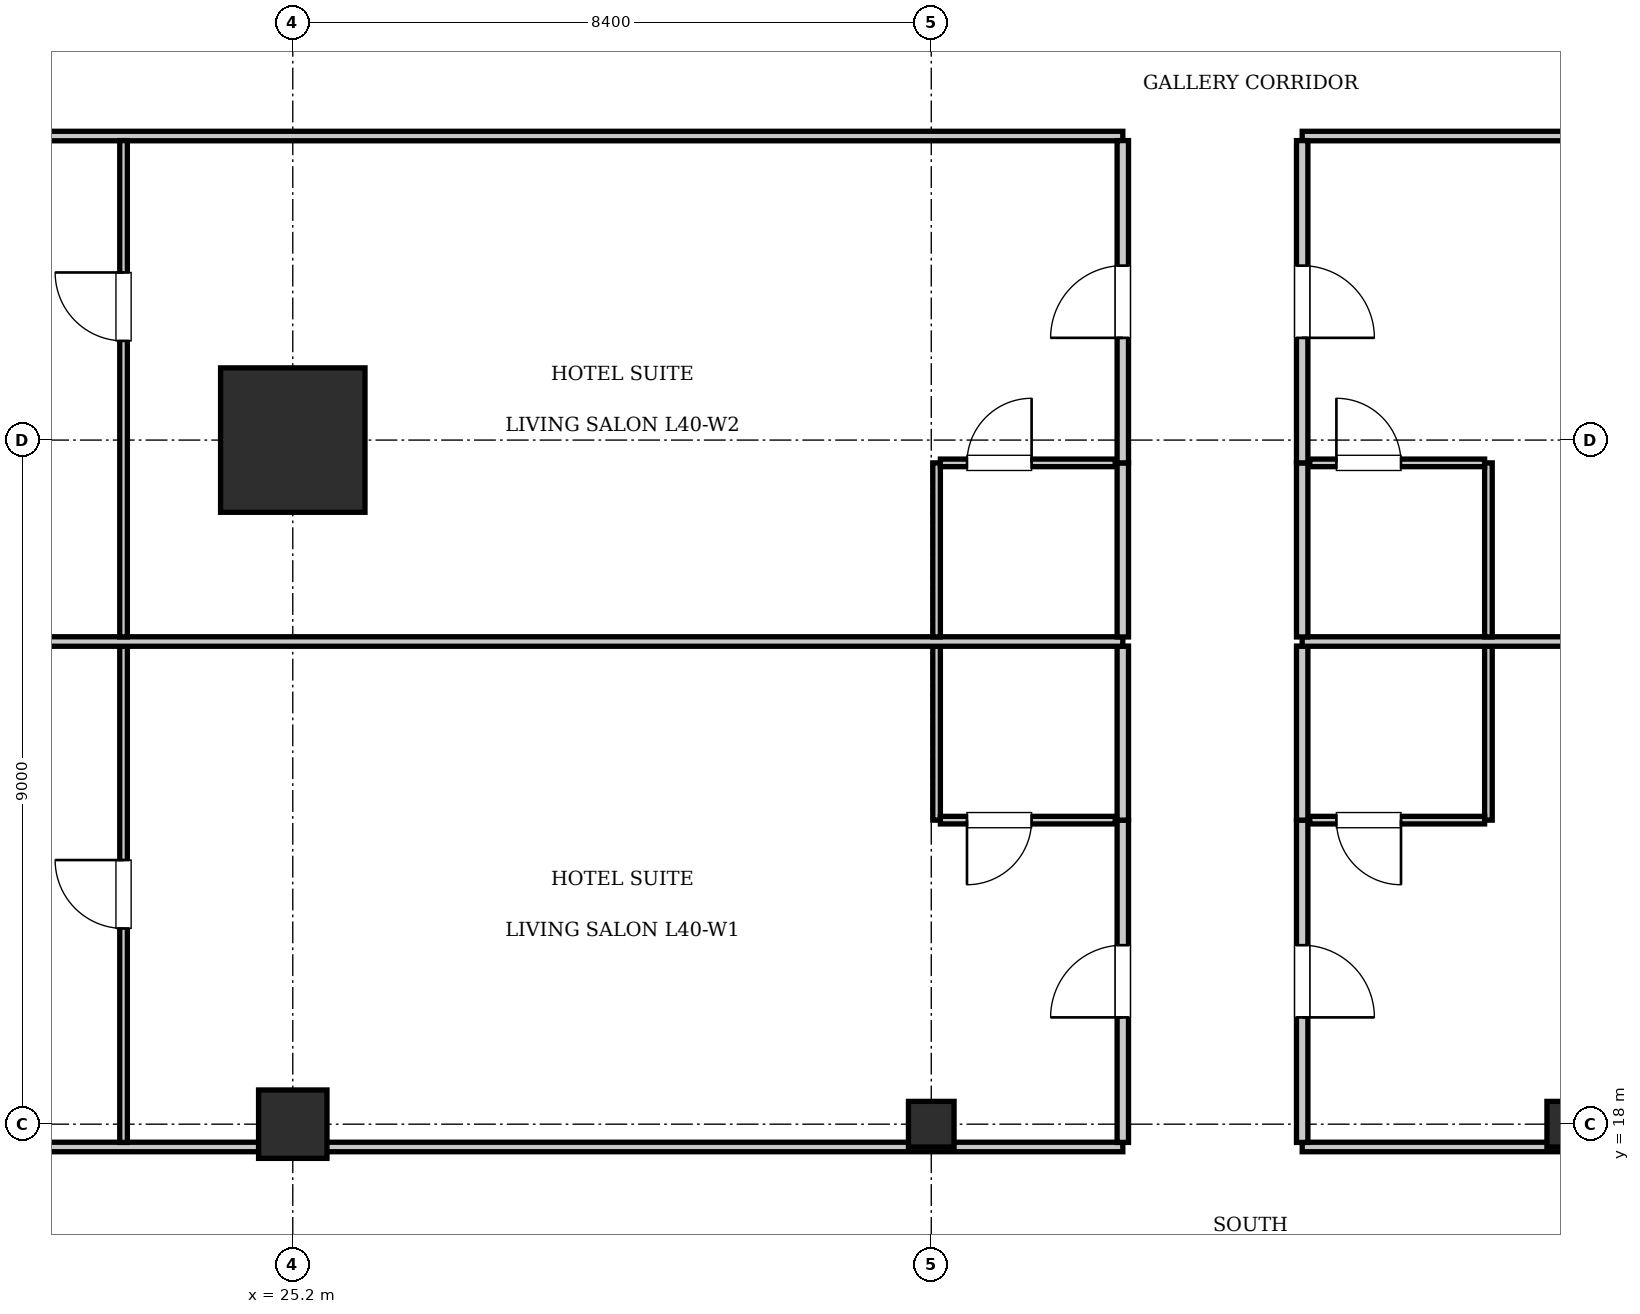
"""IFC4 building model, lengths in metres.
Left out: names, types, materials, properties, quantities, classifications, styles, units other than length and angle.
Written with IfcOpenShell. Run it as: python <this file> out.ifc"""

import sys

from ifc_helpers import new_model, si_unit, direction, frame, frame_2d, origin, origin_2d, place, context, subcontext, project, spatial, rectangle, i_section, extrude, element, fill, save


model = new_model("IFC4")
c1 = context("Model", 3, precision=1e-05, world=origin(), true_north=direction((0.0, 1.0)))
c2 = subcontext(c1, "Body", "Model", "MODEL_VIEW")
j1 = project(units=[si_unit("LENGTHUNIT", "METRE"), si_unit("PLANEANGLEUNIT", "RADIAN")], contexts=[c1])
p1 = place(None, origin())
s1 = spatial("IfcSite", under=j1, at=p1, CompositionType="ELEMENT")
p2 = place(p1, origin())
s2 = spatial("IfcBuilding", under=s1, at=p2, CompositionType="ELEMENT")
p3 = place(p2, frame((0.0, 0.0, 165.9)))
s3 = spatial("IfcBuildingStorey", under=s2, at=p3, CompositionType="ELEMENT", Elevation=165.9)
p4 = place(p3, frame((25.2, 27.0, 0.0), z_axis=(0.0, 0.0, 1.0), x_axis=(1.0, 0.0, 0.0)))
e1 = element("IfcColumn", 1, at=p4, inside=s3, PredefinedType="COLUMN", context=c2, shape_type="SweptSolid", body=[
    extrude(rectangle(XDim=1.9, YDim=1.9, at=origin_2d()), origin(), (0.0, 0.0, 1.0), 3.85),
])
p5 = place(p3, frame((25.2, 18.0, 0.0), z_axis=(0.0, 0.0, 1.0), x_axis=(1.0, 0.0, 0.0)))
e2 = element("IfcColumn", 2, at=p5, inside=s3, PredefinedType="COLUMN", context=c2, shape_type="SweptSolid", body=[
    extrude(rectangle(XDim=0.9, YDim=0.9, at=origin_2d()), origin(), (0.0, 0.0, 1.0), 3.85),
])
for number, where, z_axis, x_axis in (
    (3, (33.6, 18.0, 0.0), (0.0, 0.0, 1.0), (1.0, 0.0, 0.0)),
    (4, (42.0, 18.0, 0.0), (0.0, 0.0, 1.0), (1.0, 0.0, 0.0)),
):
    element("IfcColumn", number, at=place(p3, frame(where, z_axis=z_axis, x_axis=x_axis)), inside=s3, PredefinedType="COLUMN", context=c2, shape_type="SweptSolid", body=[
        extrude(i_section(OverallWidth=0.6, OverallDepth=0.6, WebThickness=0.025, FlangeThickness=0.038, at=origin_2d()), origin(), (0.0, 0.0, 1.0), 3.85),
    ])
p6 = place(p3, frame((13.2, 17.7, 0.0), z_axis=(0.0, 0.0, 1.0), x_axis=(1.0, 0.0, 0.0)))
e5 = element("IfcWall", 5, at=p6, inside=s3, PredefinedType="PARTITIONING", context=c2, shape_type="SweptSolid", body=[
    extrude(rectangle(XDim=22.92, YDim=0.125, at=frame_2d((11.46, 0.0))), origin(), (0.0, 0.0, 1.0), 3.61),
])
p7 = place(p3, frame((38.48, 17.7, 0.0), z_axis=(0.0, 0.0, 1.0), x_axis=(1.0, 0.0, 0.0)))
e6 = element("IfcWall", 6, at=p7, inside=s3, PredefinedType="PARTITIONING", context=c2, shape_type="SweptSolid", body=[
    extrude(rectangle(XDim=23.92, YDim=0.125, at=frame_2d((11.96, 0.0))), origin(), (0.0, 0.0, 1.0), 3.61),
])
p8 = place(p3, frame((13.2, 31.0, 0.0), z_axis=(0.0, 0.0, 1.0), x_axis=(1.0, 0.0, 0.0)))
e7 = element("IfcWall", 7, at=p8, inside=s3, PredefinedType="PARTITIONING", context=c2, shape_type="SweptSolid", body=[
    extrude(rectangle(XDim=22.92, YDim=0.125, at=frame_2d((11.46, 0.0))), origin(), (0.0, 0.0, 1.0), 3.61),
])
p9 = place(p3, frame((38.48, 31.0, 0.0), z_axis=(0.0, 0.0, 1.0), x_axis=(1.0, 0.0, 0.0)))
e8 = element("IfcWall", 8, at=p9, inside=s3, PredefinedType="PARTITIONING", context=c2, shape_type="SweptSolid", body=[
    extrude(rectangle(XDim=23.92, YDim=0.125, at=frame_2d((11.96, 0.0))), origin(), (0.0, 0.0, 1.0), 3.61),
])
p10 = place(p3, frame((36.12, 17.76, 0.0), z_axis=(0.0, 0.0, 1.0), x_axis=(0.0, 1.0, 0.0)))
e9 = element("IfcWall", 9, at=p10, inside=s3, PredefinedType="PARTITIONING", context=c2, shape_type="SweptSolid", body=[
    extrude(rectangle(XDim=4.24, YDim=0.15, at=frame_2d((2.12, 0.0))), origin(), (0.0, 0.0, 1.0), 3.61),
])
p11 = place(p10, frame((1.645, 0.0, 0.0)))
e10 = element("IfcOpeningElement", 10, at=p11, cuts=e9, PredefinedType="OPENING", context=c2, shape_type="SweptSolid", body=[
    extrude(rectangle(XDim=0.95, YDim=2.15, at=frame_2d((0.475, 1.075))), frame((0.0, 0.085, 0.0), z_axis=(0.0, -1.0, 0.0), x_axis=(1.0, 0.0, 0.0)), (0.0, 0.0, 1.0), 0.17),
])
p12 = place(p3, frame((36.12, 22.0, 0.0), z_axis=(0.0, 0.0, 1.0), x_axis=(0.0, 1.0, 0.0)))
e11 = element("IfcWall", 11, at=p12, inside=s3, PredefinedType="PARTITIONING", context=c2, shape_type="SweptSolid", body=[
    extrude(rectangle(XDim=2.29, YDim=0.15, at=frame_2d((1.145, 0.0))), origin(), (0.0, 0.0, 1.0), 3.61),
])
p13 = place(p3, frame((33.67, 22.0, 0.0), z_axis=(0.0, 0.0, 1.0), x_axis=(0.0, 1.0, 0.0)))
e12 = element("IfcWall", 12, at=p13, inside=s3, PredefinedType="PARTITIONING", context=c2, shape_type="SweptSolid", body=[
    extrude(rectangle(XDim=2.29, YDim=0.1, at=frame_2d((1.145, 0.0))), origin(), (0.0, 0.0, 1.0), 3.007),
])
p14 = place(p3, frame((33.72, 22.0, 0.0), z_axis=(0.0, 0.0, 1.0), x_axis=(1.0, 0.0, 0.0)))
e13 = element("IfcWall", 13, at=p14, inside=s3, PredefinedType="PARTITIONING", context=c2, shape_type="SweptSolid", body=[
    extrude(rectangle(XDim=2.3, YDim=0.1, at=frame_2d((1.15, 0.0))), origin(), (0.0, 0.0, 1.0), 3.61),
])
p15 = place(p14, frame((0.35, 0.0, 0.0)))
e14 = element("IfcOpeningElement", 14, at=p15, cuts=e13, PredefinedType="OPENING", context=c2, shape_type="SweptSolid", body=[
    extrude(rectangle(XDim=0.85, YDim=2.1, at=frame_2d((0.425, 1.05))), frame((0.0, 0.06, 0.0), z_axis=(0.0, -1.0, 0.0), x_axis=(1.0, 0.0, 0.0)), (0.0, 0.0, 1.0), 0.12),
])
p16 = place(p3, frame((22.974, 17.76, 0.0), z_axis=(0.0, 0.0, 1.0), x_axis=(0.0, 1.0, 0.0)))
e15 = element("IfcWall", 15, at=p16, inside=s3, PredefinedType="PARTITIONING", context=c2, shape_type="SweptSolid", body=[
    extrude(rectangle(XDim=6.53, YDim=0.1, at=frame_2d((3.265, 0.0))), origin(), (0.0, 0.0, 1.0), 3.61),
])
p17 = place(p16, frame((2.815, 0.0, 0.0)))
e16 = element("IfcOpeningElement", 16, at=p17, cuts=e15, PredefinedType="OPENING", context=c2, shape_type="SweptSolid", body=[
    extrude(rectangle(XDim=0.9, YDim=2.1, at=frame_2d((0.45, 1.05))), frame((0.0, 0.06, 0.0), z_axis=(0.0, -1.0, 0.0), x_axis=(1.0, 0.0, 0.0)), (0.0, 0.0, 1.0), 0.12),
])
p18 = place(p3, frame((38.48, 17.76, 0.0), z_axis=(0.0, 0.0, 1.0), x_axis=(0.0, 1.0, 0.0)))
e17 = element("IfcWall", 17, at=p18, inside=s3, PredefinedType="PARTITIONING", context=c2, shape_type="SweptSolid", body=[
    extrude(rectangle(XDim=4.24, YDim=0.15, at=frame_2d((2.12, 0.0))), origin(), (0.0, 0.0, 1.0), 3.61),
])
p19 = place(p18, frame((1.645, 0.0, 0.0)))
e18 = element("IfcOpeningElement", 18, at=p19, cuts=e17, PredefinedType="OPENING", context=c2, shape_type="SweptSolid", body=[
    extrude(rectangle(XDim=0.95, YDim=2.15, at=frame_2d((0.475, 1.075))), frame((0.0, 0.085, 0.0), z_axis=(0.0, -1.0, 0.0), x_axis=(1.0, 0.0, 0.0)), (0.0, 0.0, 1.0), 0.17),
])
p20 = place(p3, frame((38.48, 22.0, 0.0), z_axis=(0.0, 0.0, 1.0), x_axis=(0.0, 1.0, 0.0)))
e19 = element("IfcWall", 19, at=p20, inside=s3, PredefinedType="PARTITIONING", context=c2, shape_type="SweptSolid", body=[
    extrude(rectangle(XDim=2.29, YDim=0.15, at=frame_2d((1.145, 0.0))), origin(), (0.0, 0.0, 1.0), 3.61),
])
p21 = place(p3, frame((40.93, 22.0, 0.0), z_axis=(0.0, 0.0, 1.0), x_axis=(0.0, 1.0, 0.0)))
e20 = element("IfcWall", 20, at=p21, inside=s3, PredefinedType="PARTITIONING", context=c2, shape_type="SweptSolid", body=[
    extrude(rectangle(XDim=2.29, YDim=0.1, at=frame_2d((1.145, 0.0))), origin(), (0.0, 0.0, 1.0), 3.61),
])
p22 = place(p3, frame((38.58, 22.0, 0.0), z_axis=(0.0, 0.0, 1.0), x_axis=(1.0, 0.0, 0.0)))
e21 = element("IfcWall", 21, at=p22, inside=s3, PredefinedType="PARTITIONING", context=c2, shape_type="SweptSolid", body=[
    extrude(rectangle(XDim=2.3, YDim=0.1, at=frame_2d((1.15, 0.0))), origin(), (0.0, 0.0, 1.0), 3.61),
])
p23 = place(p22, frame((0.35, 0.0, 0.0)))
e22 = element("IfcOpeningElement", 22, at=p23, cuts=e21, PredefinedType="OPENING", context=c2, shape_type="SweptSolid", body=[
    extrude(rectangle(XDim=0.85, YDim=2.1, at=frame_2d((0.425, 1.05))), frame((0.0, 0.06, 0.0), z_axis=(0.0, -1.0, 0.0), x_axis=(1.0, 0.0, 0.0)), (0.0, 0.0, 1.0), 0.12),
])
p24 = place(p3, frame((13.2, 24.35, 0.0), z_axis=(0.0, 0.0, 1.0), x_axis=(1.0, 0.0, 0.0)))
e23 = element("IfcWall", 23, at=p24, inside=s3, PredefinedType="PARTITIONING", context=c2, shape_type="SweptSolid", body=[
    extrude(rectangle(XDim=22.92, YDim=0.125, at=frame_2d((11.46, 0.0))), origin(), (0.0, 0.0, 1.0), 3.61),
])
p25 = place(p3, frame((38.48, 24.35, 0.0), z_axis=(0.0, 0.0, 1.0), x_axis=(1.0, 0.0, 0.0)))
e24 = element("IfcWall", 24, at=p25, inside=s3, PredefinedType="PARTITIONING", context=c2, shape_type="SweptSolid", body=[
    extrude(rectangle(XDim=23.92, YDim=0.125, at=frame_2d((11.96, 0.0))), origin(), (0.0, 0.0, 1.0), 3.61),
])
p26 = place(p3, frame((36.12, 24.41, 0.0), z_axis=(0.0, 0.0, 1.0), x_axis=(0.0, 1.0, 0.0)))
e25 = element("IfcWall", 25, at=p26, inside=s3, PredefinedType="PARTITIONING", context=c2, shape_type="SweptSolid", body=[
    extrude(rectangle(XDim=2.29, YDim=0.15, at=frame_2d((1.145, 0.0))), origin(), (0.0, 0.0, 1.0), 3.61),
])
p27 = place(p3, frame((36.12, 26.7, 0.0), z_axis=(0.0, 0.0, 1.0), x_axis=(0.0, 1.0, 0.0)))
e26 = element("IfcWall", 26, at=p27, inside=s3, PredefinedType="PARTITIONING", context=c2, shape_type="SweptSolid", body=[
    extrude(rectangle(XDim=4.24, YDim=0.15, at=frame_2d((2.12, 0.0))), origin(), (0.0, 0.0, 1.0), 3.61),
])
p28 = place(p27, frame((1.645, 0.0, 0.0)))
e27 = element("IfcOpeningElement", 27, at=p28, cuts=e26, PredefinedType="OPENING", context=c2, shape_type="SweptSolid", body=[
    extrude(rectangle(XDim=0.95, YDim=2.15, at=frame_2d((0.475, 1.075))), frame((0.0, 0.085, 0.0), z_axis=(0.0, -1.0, 0.0), x_axis=(1.0, 0.0, 0.0)), (0.0, 0.0, 1.0), 0.17),
])
p29 = place(p3, frame((33.67, 24.41, 0.0), z_axis=(0.0, 0.0, 1.0), x_axis=(0.0, 1.0, 0.0)))
e28 = element("IfcWall", 28, at=p29, inside=s3, PredefinedType="PARTITIONING", context=c2, shape_type="SweptSolid", body=[
    extrude(rectangle(XDim=2.29, YDim=0.1, at=frame_2d((1.145, 0.0))), origin(), (0.0, 0.0, 1.0), 3.007),
])
p30 = place(p3, frame((33.72, 26.7, 0.0), z_axis=(0.0, 0.0, 1.0), x_axis=(1.0, 0.0, 0.0)))
e29 = element("IfcWall", 29, at=p30, inside=s3, PredefinedType="PARTITIONING", context=c2, shape_type="SweptSolid", body=[
    extrude(rectangle(XDim=2.3, YDim=0.1, at=frame_2d((1.15, 0.0))), origin(), (0.0, 0.0, 1.0), 3.61),
])
p31 = place(p30, frame((0.35, 0.0, 0.0)))
e30 = element("IfcOpeningElement", 30, at=p31, cuts=e29, PredefinedType="OPENING", context=c2, shape_type="SweptSolid", body=[
    extrude(rectangle(XDim=0.85, YDim=2.1, at=frame_2d((0.425, 1.05))), frame((0.0, 0.06, 0.0), z_axis=(0.0, -1.0, 0.0), x_axis=(1.0, 0.0, 0.0)), (0.0, 0.0, 1.0), 0.12),
])
p32 = place(p3, frame((22.974, 24.41, 0.0), z_axis=(0.0, 0.0, 1.0), x_axis=(0.0, 1.0, 0.0)))
e31 = element("IfcWall", 31, at=p32, inside=s3, PredefinedType="PARTITIONING", context=c2, shape_type="SweptSolid", body=[
    extrude(rectangle(XDim=6.53, YDim=0.1, at=frame_2d((3.265, 0.0))), origin(), (0.0, 0.0, 1.0), 3.61),
])
p33 = place(p32, frame((3.895, 0.0, 0.0)))
e32 = element("IfcOpeningElement", 32, at=p33, cuts=e31, PredefinedType="OPENING", context=c2, shape_type="SweptSolid", body=[
    extrude(rectangle(XDim=0.9, YDim=2.1, at=frame_2d((0.45, 1.05))), frame((0.0, 0.06, 0.0), z_axis=(0.0, -1.0, 0.0), x_axis=(1.0, 0.0, 0.0)), (0.0, 0.0, 1.0), 0.12),
])
p34 = place(p3, frame((38.48, 24.41, 0.0), z_axis=(0.0, 0.0, 1.0), x_axis=(0.0, 1.0, 0.0)))
e33 = element("IfcWall", 33, at=p34, inside=s3, PredefinedType="PARTITIONING", context=c2, shape_type="SweptSolid", body=[
    extrude(rectangle(XDim=2.29, YDim=0.15, at=frame_2d((1.145, 0.0))), origin(), (0.0, 0.0, 1.0), 3.61),
])
p35 = place(p3, frame((38.48, 26.7, 0.0), z_axis=(0.0, 0.0, 1.0), x_axis=(0.0, 1.0, 0.0)))
e34 = element("IfcWall", 34, at=p35, inside=s3, PredefinedType="PARTITIONING", context=c2, shape_type="SweptSolid", body=[
    extrude(rectangle(XDim=4.24, YDim=0.15, at=frame_2d((2.12, 0.0))), origin(), (0.0, 0.0, 1.0), 3.61),
])
p36 = place(p35, frame((1.645, 0.0, 0.0)))
e35 = element("IfcOpeningElement", 35, at=p36, cuts=e34, PredefinedType="OPENING", context=c2, shape_type="SweptSolid", body=[
    extrude(rectangle(XDim=0.95, YDim=2.15, at=frame_2d((0.475, 1.075))), frame((0.0, 0.085, 0.0), z_axis=(0.0, -1.0, 0.0), x_axis=(1.0, 0.0, 0.0)), (0.0, 0.0, 1.0), 0.17),
])
p37 = place(p3, frame((40.93, 24.41, 0.0), z_axis=(0.0, 0.0, 1.0), x_axis=(0.0, 1.0, 0.0)))
e36 = element("IfcWall", 36, at=p37, inside=s3, PredefinedType="PARTITIONING", context=c2, shape_type="SweptSolid", body=[
    extrude(rectangle(XDim=2.29, YDim=0.1, at=frame_2d((1.145, 0.0))), origin(), (0.0, 0.0, 1.0), 3.61),
])
p38 = place(p3, frame((38.58, 26.7, 0.0), z_axis=(0.0, 0.0, 1.0), x_axis=(1.0, 0.0, 0.0)))
e37 = element("IfcWall", 37, at=p38, inside=s3, PredefinedType="PARTITIONING", context=c2, shape_type="SweptSolid", body=[
    extrude(rectangle(XDim=2.3, YDim=0.1, at=frame_2d((1.15, 0.0))), origin(), (0.0, 0.0, 1.0), 3.61),
])
p39 = place(p38, frame((0.35, 0.0, 0.0)))
e38 = element("IfcOpeningElement", 38, at=p39, cuts=e37, PredefinedType="OPENING", context=c2, shape_type="SweptSolid", body=[
    extrude(rectangle(XDim=0.85, YDim=2.1, at=frame_2d((0.425, 1.05))), frame((0.0, 0.06, 0.0), z_axis=(0.0, -1.0, 0.0), x_axis=(1.0, 0.0, 0.0)), (0.0, 0.0, 1.0), 0.12),
])
p40 = place(p15, frame((0.85, 0.0, 0.0), z_axis=(0.0, 0.0, 1.0), x_axis=(-1.0, 0.0, 0.0)))
e39 = element("IfcDoor", 39, at=p40, inside=s3, OperationType="SINGLE_SWING_RIGHT", PredefinedType="DOOR", context=c2, shape_type="SweptSolid", body=[
    extrude(rectangle(XDim=0.85, YDim=2.1, at=frame_2d((0.425, 1.05))), frame((0.0, 0.025, 0.0), z_axis=(0.0, -1.0, 0.0), x_axis=(1.0, 0.0, 0.0)), (0.0, 0.0, 1.0), 0.05),
])
fill(e14, e39)
p41 = place(p11, origin())
e40 = element("IfcDoor", 40, at=p41, inside=s3, OperationType="SINGLE_SWING_LEFT", PredefinedType="DOOR", context=c2, shape_type="SweptSolid", body=[
    extrude(rectangle(XDim=0.95, YDim=2.15, at=frame_2d((0.475, 1.075))), frame((0.0, 0.025, 0.0), z_axis=(0.0, -1.0, 0.0), x_axis=(1.0, 0.0, 0.0)), (0.0, 0.0, 1.0), 0.05),
])
fill(e10, e40)
p42 = place(p17, origin())
e41 = element("IfcDoor", 41, at=p42, inside=s3, OperationType="SINGLE_SWING_RIGHT", PredefinedType="DOOR", context=c2, shape_type="SweptSolid", body=[
    extrude(rectangle(XDim=0.9, YDim=2.1, at=frame_2d((0.45, 1.05))), frame((0.0, 0.025, 0.0), z_axis=(0.0, -1.0, 0.0), x_axis=(1.0, 0.0, 0.0)), (0.0, 0.0, 1.0), 0.05),
])
fill(e16, e41)
p43 = place(p23, frame((0.85, 0.0, 0.0), z_axis=(0.0, 0.0, 1.0), x_axis=(-1.0, 0.0, 0.0)))
e42 = element("IfcDoor", 42, at=p43, inside=s3, OperationType="SINGLE_SWING_LEFT", PredefinedType="DOOR", context=c2, shape_type="SweptSolid", body=[
    extrude(rectangle(XDim=0.85, YDim=2.1, at=frame_2d((0.425, 1.05))), frame((0.0, 0.025, 0.0), z_axis=(0.0, -1.0, 0.0), x_axis=(1.0, 0.0, 0.0)), (0.0, 0.0, 1.0), 0.05),
])
fill(e22, e42)
p44 = place(p19, frame((0.95, 0.0, 0.0), z_axis=(0.0, 0.0, 1.0), x_axis=(-1.0, 0.0, 0.0)))
e43 = element("IfcDoor", 43, at=p44, inside=s3, OperationType="SINGLE_SWING_RIGHT", PredefinedType="DOOR", context=c2, shape_type="SweptSolid", body=[
    extrude(rectangle(XDim=0.95, YDim=2.15, at=frame_2d((0.475, 1.075))), frame((0.0, 0.025, 0.0), z_axis=(0.0, -1.0, 0.0), x_axis=(1.0, 0.0, 0.0)), (0.0, 0.0, 1.0), 0.05),
])
fill(e18, e43)
p45 = place(p31, origin())
e44 = element("IfcDoor", 44, at=p45, inside=s3, OperationType="SINGLE_SWING_RIGHT", PredefinedType="DOOR", context=c2, shape_type="SweptSolid", body=[
    extrude(rectangle(XDim=0.85, YDim=2.1, at=frame_2d((0.425, 1.05))), frame((0.0, 0.025, 0.0), z_axis=(0.0, -1.0, 0.0), x_axis=(1.0, 0.0, 0.0)), (0.0, 0.0, 1.0), 0.05),
])
fill(e30, e44)
p46 = place(p28, origin())
e45 = element("IfcDoor", 45, at=p46, inside=s3, OperationType="SINGLE_SWING_LEFT", PredefinedType="DOOR", context=c2, shape_type="SweptSolid", body=[
    extrude(rectangle(XDim=0.95, YDim=2.15, at=frame_2d((0.475, 1.075))), frame((0.0, 0.025, 0.0), z_axis=(0.0, -1.0, 0.0), x_axis=(1.0, 0.0, 0.0)), (0.0, 0.0, 1.0), 0.05),
])
fill(e27, e45)
p47 = place(p33, origin())
e46 = element("IfcDoor", 46, at=p47, inside=s3, OperationType="SINGLE_SWING_RIGHT", PredefinedType="DOOR", context=c2, shape_type="SweptSolid", body=[
    extrude(rectangle(XDim=0.9, YDim=2.1, at=frame_2d((0.45, 1.05))), frame((0.0, 0.025, 0.0), z_axis=(0.0, -1.0, 0.0), x_axis=(1.0, 0.0, 0.0)), (0.0, 0.0, 1.0), 0.05),
])
fill(e32, e46)
p48 = place(p39, origin())
e47 = element("IfcDoor", 47, at=p48, inside=s3, OperationType="SINGLE_SWING_LEFT", PredefinedType="DOOR", context=c2, shape_type="SweptSolid", body=[
    extrude(rectangle(XDim=0.85, YDim=2.1, at=frame_2d((0.425, 1.05))), frame((0.0, 0.025, 0.0), z_axis=(0.0, -1.0, 0.0), x_axis=(1.0, 0.0, 0.0)), (0.0, 0.0, 1.0), 0.05),
])
fill(e38, e47)
p49 = place(p36, frame((0.95, 0.0, 0.0), z_axis=(0.0, 0.0, 1.0), x_axis=(-1.0, 0.0, 0.0)))
e48 = element("IfcDoor", 48, at=p49, inside=s3, OperationType="SINGLE_SWING_RIGHT", PredefinedType="DOOR", context=c2, shape_type="SweptSolid", body=[
    extrude(rectangle(XDim=0.95, YDim=2.15, at=frame_2d((0.475, 1.075))), frame((0.0, 0.025, 0.0), z_axis=(0.0, -1.0, 0.0), x_axis=(1.0, 0.0, 0.0)), (0.0, 0.0, 1.0), 0.05),
])
fill(e35, e48)
save(model, sys.argv[1])
